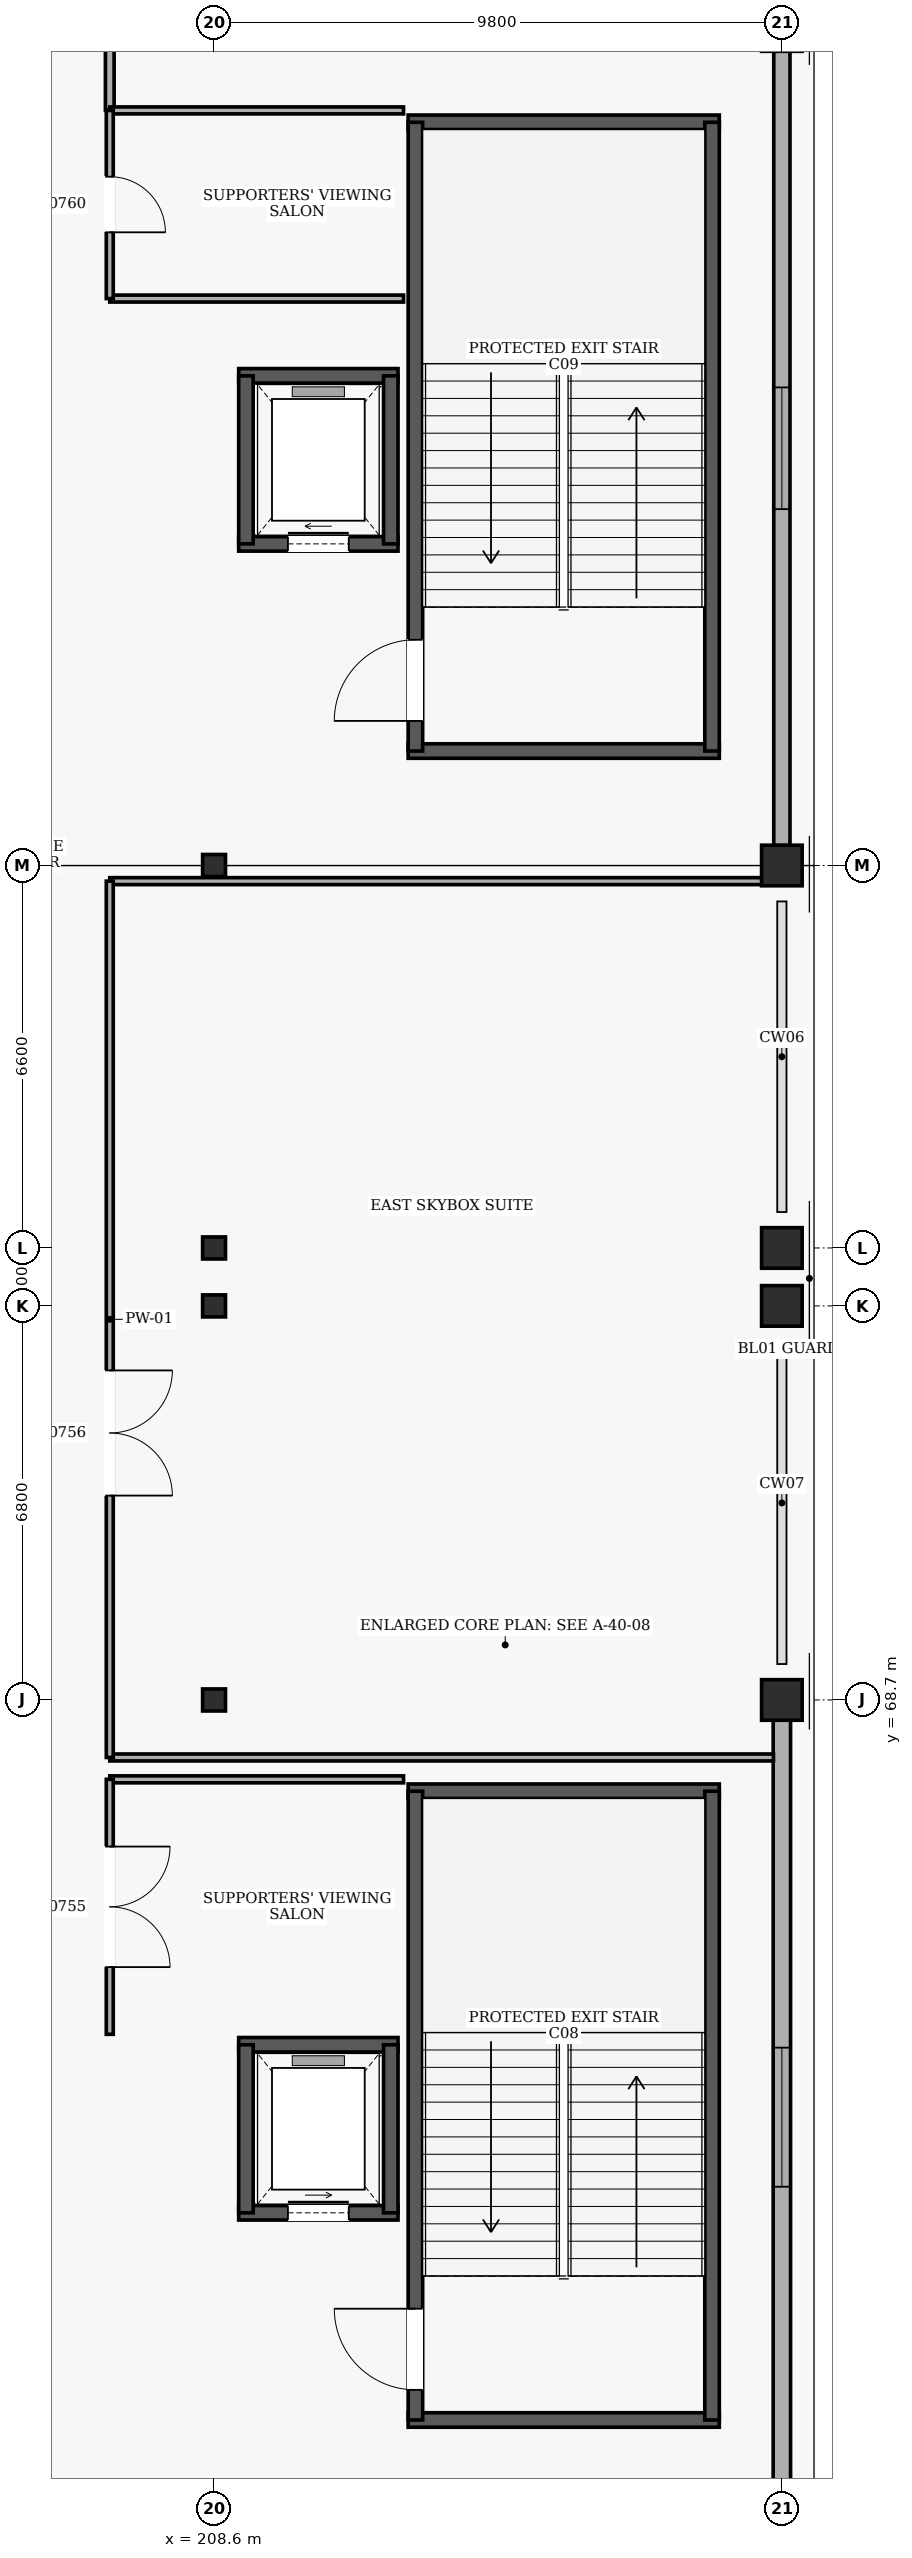
"""IFC4 building model, lengths in metres.
Left out: names, types, materials, properties, quantities, classifications, styles, units other than length and angle.
Written with IfcOpenShell. Run it as: python <this file> out.ifc"""

import sys

from ifc_helpers import new_model, si_unit, direction, frame, frame_2d, origin, origin_2d, place, context, subcontext, project, spatial, rectangle, i_section, extrude, element, fill, save


model = new_model("IFC4")
c1 = context("Model", 3, precision=1e-05, world=origin(), true_north=direction((0.0, 1.0)))
c2 = subcontext(c1, "Body", "Model", "MODEL_VIEW")
j1 = project(units=[si_unit("LENGTHUNIT", "METRE"), si_unit("PLANEANGLEUNIT", "RADIAN")], contexts=[c1])
p1 = place(None, origin())
s1 = spatial("IfcSite", under=j1, at=p1, CompositionType="ELEMENT")
p2 = place(p1, origin())
s2 = spatial("IfcBuilding", under=s1, at=p2, CompositionType="ELEMENT")
p3 = place(p2, frame((0.0, 0.0, 19.8)))
s3 = spatial("IfcBuildingStorey", under=s2, at=p3, CompositionType="ELEMENT", Elevation=19.8)
for number, where, z_axis, x_axis in (
    (1, (208.6, 68.7, 0.0), (0.0, 0.0, 1.0), (1.0, 0.0, 0.0)),
    (2, (208.6, 75.5, 0.0), (0.0, 0.0, 1.0), (1.0, 0.0, 0.0)),
    (3, (208.6, 76.5, 0.0), (0.0, 0.0, 1.0), (1.0, 0.0, 0.0)),
    (4, (208.6, 83.1, 0.0), (0.0, 0.0, 1.0), (1.0, 0.0, 0.0)),
):
    element("IfcColumn", number, at=place(p3, frame(where, z_axis=z_axis, x_axis=x_axis)), inside=s3, PredefinedType="COLUMN", context=c2, shape_type="SweptSolid", body=[
        extrude(i_section(OverallWidth=0.395, OverallDepth=0.38, WebThickness=0.019, FlangeThickness=0.03, at=origin_2d()), origin(), (0.0, 0.0, 1.0), 4.8),
    ])
for number, where, z_axis, x_axis in (
    (5, (218.4, 68.7, 0.0), (0.0, 0.0, 1.0), (1.0, 0.0, 0.0)),
    (6, (218.4, 75.5, 0.0), (0.0, 0.0, 1.0), (1.0, 0.0, 0.0)),
    (7, (218.4, 76.5, 0.0), (0.0, 0.0, 1.0), (1.0, 0.0, 0.0)),
    (8, (218.4, 83.1, 0.0), (0.0, 0.0, 1.0), (1.0, 0.0, 0.0)),
):
    element("IfcColumn", number, at=place(p3, frame(where, z_axis=z_axis, x_axis=x_axis)), inside=s3, PredefinedType="COLUMN", context=c2, shape_type="SweptSolid", body=[
        extrude(rectangle(XDim=0.7, YDim=0.7, at=origin_2d()), origin(), (0.0, 0.0, 1.0), 4.8),
    ])
p4 = place(p3, frame((218.4, 97.155, 0.0), z_axis=(0.0, 0.0, 1.0), x_axis=(0.0, -1.0, 0.0)))
e9 = element("IfcWall", 9, at=p4, inside=s3, PredefinedType="SOLIDWALL", context=c2, shape_type="SweptSolid", body=[
    extrude(rectangle(XDim=13.71, YDim=0.28, at=frame_2d((6.855, 0.0))), origin(), (0.0, 0.0, 1.0), 3.58),
])
p5 = place(p4, frame((5.805, 0.0, 0.9)))
e10 = element("IfcOpeningElement", 10, at=p5, cuts=e9, PredefinedType="OPENING", context=c2, shape_type="SweptSolid", body=[
    extrude(rectangle(XDim=2.1, YDim=1.8, at=frame_2d((1.05, 0.9))), frame((0.0, 0.15, 0.0), z_axis=(0.0, -1.0, 0.0), x_axis=(1.0, 0.0, 0.0)), (0.0, 0.0, 1.0), 0.3),
])
p6 = place(p3, frame((218.4, 68.355, 0.0), z_axis=(0.0, 0.0, 1.0), x_axis=(0.0, -1.0, 0.0)))
e11 = element("IfcWall", 11, at=p6, inside=s3, PredefinedType="SOLIDWALL", context=c2, shape_type="SweptSolid", body=[
    extrude(rectangle(XDim=13.71, YDim=0.3, at=frame_2d((6.855, 0.0))), origin(), (0.0, 0.0, 1.0), 3.58),
])
p7 = place(p6, frame((5.655, 0.0, 0.9)))
e12 = element("IfcOpeningElement", 12, at=p7, cuts=e11, PredefinedType="OPENING", context=c2, shape_type="SweptSolid", body=[
    extrude(rectangle(XDim=2.4, YDim=1.8, at=frame_2d((1.2, 0.9))), frame((0.0, 0.16, 0.0), z_axis=(0.0, -1.0, 0.0), x_axis=(1.0, 0.0, 0.0)), (0.0, 0.0, 1.0), 0.32),
])
for number, where, z_axis, x_axis in (
    (13, (211.95, 56.275, 0.0), (0.0, 0.0, 1.0), (1.0, 0.0, 0.0)),
    (14, (217.32, 67.125, 0.0), (0.0, 0.0, 1.0), (-1.0, 0.0, 0.0)),
):
    element("IfcWall", number, at=place(p3, frame(where, z_axis=z_axis, x_axis=x_axis)), inside=s3, PredefinedType="SHEAR", context=c2, shape_type="SweptSolid", body=[
        extrude(rectangle(XDim=5.37, YDim=0.25, at=frame_2d((2.685, 0.0))), origin(), (0.0, 0.0, 1.0), 4.5),
    ])
p8 = place(p3, frame((212.075, 56.275, 0.0), z_axis=(0.0, 0.0, 1.0), x_axis=(0.0, 1.0, 0.0)))
e15 = element("IfcWall", 15, at=p8, inside=s3, PredefinedType="SHEAR", context=c2, shape_type="SweptSolid", body=[
    extrude(rectangle(XDim=10.85, YDim=0.25, at=frame_2d((5.425, 0.0))), origin(), (0.0, 0.0, 1.0), 4.5),
])
p9 = place(p8, frame((0.52, 0.0, 0.0)))
e16 = element("IfcOpeningElement", 16, at=p9, cuts=e15, PredefinedType="OPENING", context=c2, shape_type="SweptSolid", body=[
    extrude(rectangle(XDim=1.4, YDim=2.15, at=frame_2d((0.7, 1.075))), frame((0.0, 0.135, 0.0), z_axis=(0.0, -1.0, 0.0), x_axis=(1.0, 0.0, 0.0)), (0.0, 0.0, 1.0), 0.27),
])
p10 = place(p3, frame((217.195, 56.275, 0.0), z_axis=(0.0, 0.0, 1.0), x_axis=(0.0, 1.0, 0.0)))
e17 = element("IfcWall", 17, at=p10, inside=s3, PredefinedType="SHEAR", context=c2, shape_type="SweptSolid", body=[
    extrude(rectangle(XDim=10.85, YDim=0.25, at=frame_2d((5.425, 0.0))), origin(), (0.0, 0.0, 1.0), 4.5),
])
for number, where, z_axis, x_axis in (
    (18, (211.95, 85.075, 0.0), (0.0, 0.0, 1.0), (1.0, 0.0, 0.0)),
    (19, (217.32, 95.925, 0.0), (0.0, 0.0, 1.0), (-1.0, 0.0, 0.0)),
):
    element("IfcWall", number, at=place(p3, frame(where, z_axis=z_axis, x_axis=x_axis)), inside=s3, PredefinedType="SHEAR", context=c2, shape_type="SweptSolid", body=[
        extrude(rectangle(XDim=5.37, YDim=0.25, at=frame_2d((2.685, 0.0))), origin(), (0.0, 0.0, 1.0), 4.5),
    ])
p11 = place(p3, frame((212.075, 85.075, 0.0), z_axis=(0.0, 0.0, 1.0), x_axis=(0.0, 1.0, 0.0)))
e20 = element("IfcWall", 20, at=p11, inside=s3, PredefinedType="SHEAR", context=c2, shape_type="SweptSolid", body=[
    extrude(rectangle(XDim=10.85, YDim=0.25, at=frame_2d((5.425, 0.0))), origin(), (0.0, 0.0, 1.0), 4.5),
])
p12 = place(p11, frame((0.52, 0.0, 0.0)))
e21 = element("IfcOpeningElement", 21, at=p12, cuts=e20, PredefinedType="OPENING", context=c2, shape_type="SweptSolid", body=[
    extrude(rectangle(XDim=1.4, YDim=2.15, at=frame_2d((0.7, 1.075))), frame((0.0, 0.135, 0.0), z_axis=(0.0, -1.0, 0.0), x_axis=(1.0, 0.0, 0.0)), (0.0, 0.0, 1.0), 0.27),
])
p13 = place(p3, frame((217.195, 85.075, 0.0), z_axis=(0.0, 0.0, 1.0), x_axis=(0.0, 1.0, 0.0)))
e22 = element("IfcWall", 22, at=p13, inside=s3, PredefinedType="SHEAR", context=c2, shape_type="SweptSolid", body=[
    extrude(rectangle(XDim=10.85, YDim=0.25, at=frame_2d((5.425, 0.0))), origin(), (0.0, 0.0, 1.0), 4.5),
])
p14 = place(p3, frame((209.025, 59.85, 0.0), z_axis=(0.0, 0.0, 1.0), x_axis=(1.0, 0.0, 0.0)))
e23 = element("IfcWall", 23, at=p14, inside=s3, PredefinedType="SHEAR", context=c2, shape_type="SweptSolid", body=[
    extrude(rectangle(XDim=2.75, YDim=0.25, at=frame_2d((1.375, 0.0))), origin(), (0.0, 0.0, 1.0), 4.5),
])
p15 = place(p14, frame((0.85, 0.0, 0.0)))
e24 = element("IfcOpeningElement", 24, at=p15, cuts=e23, PredefinedType="OPENING", context=c2, shape_type="SweptSolid", body=[
    extrude(rectangle(XDim=1.05, YDim=2.15, at=frame_2d((0.525, 1.075))), frame((0.0, 0.135, 0.0), z_axis=(0.0, -1.0, 0.0), x_axis=(1.0, 0.0, 0.0)), (0.0, 0.0, 1.0), 0.27),
])
p16 = place(p3, frame((211.775, 62.75, 0.0), z_axis=(0.0, 0.0, 1.0), x_axis=(-1.0, 0.0, 0.0)))
e25 = element("IfcWall", 25, at=p16, inside=s3, PredefinedType="SHEAR", context=c2, shape_type="SweptSolid", body=[
    extrude(rectangle(XDim=2.75, YDim=0.25, at=frame_2d((1.375, 0.0))), origin(), (0.0, 0.0, 1.0), 4.5),
])
for number, where, z_axis, x_axis in (
    (26, (209.15, 62.75, 0.0), (0.0, 0.0, 1.0), (0.0, -1.0, 0.0)),
    (27, (211.65, 59.85, 0.0), (0.0, 0.0, 1.0), (0.0, 1.0, 0.0)),
):
    element("IfcWall", number, at=place(p3, frame(where, z_axis=z_axis, x_axis=x_axis)), inside=s3, PredefinedType="SHEAR", context=c2, shape_type="SweptSolid", body=[
        extrude(rectangle(XDim=2.9, YDim=0.25, at=frame_2d((1.45, 0.0))), origin(), (0.0, 0.0, 1.0), 4.5),
    ])
p17 = place(p3, frame((209.025, 88.65, 0.0), z_axis=(0.0, 0.0, 1.0), x_axis=(1.0, 0.0, 0.0)))
e28 = element("IfcWall", 28, at=p17, inside=s3, PredefinedType="SHEAR", context=c2, shape_type="SweptSolid", body=[
    extrude(rectangle(XDim=2.75, YDim=0.25, at=frame_2d((1.375, 0.0))), origin(), (0.0, 0.0, 1.0), 4.5),
])
p18 = place(p17, frame((0.85, 0.0, 0.0)))
e29 = element("IfcOpeningElement", 29, at=p18, cuts=e28, PredefinedType="OPENING", context=c2, shape_type="SweptSolid", body=[
    extrude(rectangle(XDim=1.05, YDim=2.15, at=frame_2d((0.525, 1.075))), frame((0.0, 0.135, 0.0), z_axis=(0.0, -1.0, 0.0), x_axis=(1.0, 0.0, 0.0)), (0.0, 0.0, 1.0), 0.27),
])
p19 = place(p3, frame((211.775, 91.55, 0.0), z_axis=(0.0, 0.0, 1.0), x_axis=(-1.0, 0.0, 0.0)))
e30 = element("IfcWall", 30, at=p19, inside=s3, PredefinedType="SHEAR", context=c2, shape_type="SweptSolid", body=[
    extrude(rectangle(XDim=2.75, YDim=0.25, at=frame_2d((1.375, 0.0))), origin(), (0.0, 0.0, 1.0), 4.5),
])
for number, where, z_axis, x_axis in (
    (31, (209.15, 91.55, 0.0), (0.0, 0.0, 1.0), (0.0, -1.0, 0.0)),
    (32, (211.65, 88.65, 0.0), (0.0, 0.0, 1.0), (0.0, 1.0, 0.0)),
):
    element("IfcWall", number, at=place(p3, frame(where, z_axis=z_axis, x_axis=x_axis)), inside=s3, PredefinedType="SHEAR", context=c2, shape_type="SweptSolid", body=[
        extrude(rectangle(XDim=2.9, YDim=0.25, at=frame_2d((1.45, 0.0))), origin(), (0.0, 0.0, 1.0), 4.5),
    ])
p20 = place(p3, frame((211.87, 67.33, 0.0), z_axis=(0.0, 0.0, 1.0), x_axis=(-1.0, 0.0, 0.0)))
e33 = element("IfcWall", 33, at=p20, inside=s3, PredefinedType="PARTITIONING", context=c2, shape_type="SweptSolid", body=[
    extrude(rectangle(XDim=5.07, YDim=0.12, at=frame_2d((2.535, 0.0))), origin(), (0.0, 0.0, 1.0), 4.5),
])
p21 = place(p3, frame((206.8, 67.33, 0.0), z_axis=(0.0, 0.0, 1.0), x_axis=(0.0, -1.0, 0.0)))
e34 = element("IfcWall", 34, at=p21, inside=s3, PredefinedType="PARTITIONING", context=c2, shape_type="SweptSolid", body=[
    extrude(rectangle(XDim=4.4, YDim=0.12, at=frame_2d((2.2, 0.0))), origin(), (0.0, 0.0, 1.0), 4.5),
])
p22 = place(p21, frame((1.16, 0.0, 0.0)))
e35 = element("IfcOpeningElement", 35, at=p22, cuts=e34, PredefinedType="OPENING", context=c2, shape_type="SweptSolid", body=[
    extrude(rectangle(XDim=2.08, YDim=2.35, at=frame_2d((1.04, 1.175))), frame((0.0, 0.07, 0.0), z_axis=(0.0, -1.0, 0.0), x_axis=(1.0, 0.0, 0.0)), (0.0, 0.0, 1.0), 0.14),
])
p23 = place(p3, frame((206.8, 67.708, 0.0), z_axis=(0.0, 0.0, 1.0), x_axis=(1.0, 0.0, 0.0)))
e36 = element("IfcWall", 36, at=p23, inside=s3, PredefinedType="PARTITIONING", context=c2, shape_type="SweptSolid", body=[
    extrude(rectangle(XDim=11.455, YDim=0.12, at=frame_2d((5.728, 0.0))), origin(), (0.0, 0.0, 1.0), 4.5),
])
p24 = place(p3, frame((218.255, 82.83, 0.0), z_axis=(0.0, 0.0, 1.0), x_axis=(-1.0, 0.0, 0.0)))
e37 = element("IfcWall", 37, at=p24, inside=s3, PredefinedType="PARTITIONING", context=c2, shape_type="SweptSolid", body=[
    extrude(rectangle(XDim=11.455, YDim=0.12, at=frame_2d((5.728, 0.0))), origin(), (0.0, 0.0, 1.0), 3.58),
])
p25 = place(p3, frame((206.8, 82.83, 0.0), z_axis=(0.0, 0.0, 1.0), x_axis=(0.0, -1.0, 0.0)))
e38 = element("IfcWall", 38, at=p25, inside=s3, PredefinedType="PARTITIONING", context=c2, shape_type="SweptSolid", body=[
    extrude(rectangle(XDim=15.123, YDim=0.12, at=frame_2d((7.561, 0.0))), origin(), (0.0, 0.0, 1.0), 4.5),
])
p26 = place(p25, frame((8.443, 0.0, 0.0)))
e39 = element("IfcOpeningElement", 39, at=p26, cuts=e38, PredefinedType="OPENING", context=c2, shape_type="SweptSolid", body=[
    extrude(rectangle(XDim=2.16, YDim=2.35, at=frame_2d((1.08, 1.175))), frame((0.0, 0.07, 0.0), z_axis=(0.0, -1.0, 0.0), x_axis=(1.0, 0.0, 0.0)), (0.0, 0.0, 1.0), 0.14),
])
p27 = place(p3, frame((206.8, 101.817, 0.0), z_axis=(0.0, 0.0, 1.0), x_axis=(0.0, -1.0, 0.0)))
e40 = element("IfcWall", 40, at=p27, inside=s3, PredefinedType="PARTITIONING", context=c2, shape_type="SweptSolid", body=[
    extrude(rectangle(XDim=5.687, YDim=0.15, at=frame_2d((2.843, 0.0))), origin(), (0.0, 0.0, 1.0), 4.5),
])
p28 = place(p27, frame((2.383, 0.0, 0.0)))
e41 = element("IfcOpeningElement", 41, at=p28, cuts=e40, PredefinedType="OPENING", context=c2, shape_type="SweptSolid", body=[
    extrude(rectangle(XDim=0.92, YDim=2.1, at=frame_2d((0.46, 1.05))), frame((0.0, 0.085, 0.0), z_axis=(0.0, -1.0, 0.0), x_axis=(1.0, 0.0, 0.0)), (0.0, 0.0, 1.0), 0.17),
])
for number, where, z_axis, x_axis in (
    (42, (206.8, 92.883, 0.0), (0.0, 0.0, 1.0), (1.0, 0.0, 0.0)),
    (43, (211.87, 96.13, 0.0), (0.0, 0.0, 1.0), (-1.0, 0.0, 0.0)),
):
    element("IfcWall", number, at=place(p3, frame(where, z_axis=z_axis, x_axis=x_axis)), inside=s3, PredefinedType="PARTITIONING", context=c2, shape_type="SweptSolid", body=[
        extrude(rectangle(XDim=5.07, YDim=0.12, at=frame_2d((2.535, 0.0))), origin(), (0.0, 0.0, 1.0), 4.5),
    ])
p29 = place(p3, frame((206.8, 96.13, 0.0), z_axis=(0.0, 0.0, 1.0), x_axis=(0.0, -1.0, 0.0)))
e44 = element("IfcWall", 44, at=p29, inside=s3, PredefinedType="PARTITIONING", context=c2, shape_type="SweptSolid", body=[
    extrude(rectangle(XDim=3.247, YDim=0.12, at=frame_2d((1.623, 0.0))), origin(), (0.0, 0.0, 1.0), 4.5),
])
p30 = place(p29, frame((1.143, 0.0, 0.0)))
e45 = element("IfcOpeningElement", 45, at=p30, cuts=e44, PredefinedType="OPENING", context=c2, shape_type="SweptSolid", body=[
    extrude(rectangle(XDim=0.96, YDim=2.1, at=frame_2d((0.48, 1.05))), frame((0.0, 0.07, 0.0), z_axis=(0.0, -1.0, 0.0), x_axis=(1.0, 0.0, 0.0)), (0.0, 0.0, 1.0), 0.14),
])
p31 = place(p5, origin())
e46 = element("IfcWindow", 46, at=p31, inside=s3, PartitioningType="SINGLE_PANEL", PredefinedType="WINDOW", context=c2, shape_type="SweptSolid", body=[
    extrude(rectangle(XDim=2.1, YDim=1.8, at=frame_2d((1.05, 0.9))), frame((0.0, 0.03, 0.0), z_axis=(0.0, -1.0, 0.0), x_axis=(1.0, 0.0, 0.0)), (0.0, 0.0, 1.0), 0.06),
])
fill(e10, e46)
p32 = place(p7, origin())
e47 = element("IfcWindow", 47, at=p32, inside=s3, PartitioningType="SINGLE_PANEL", PredefinedType="WINDOW", context=c2, shape_type="SweptSolid", body=[
    extrude(rectangle(XDim=2.4, YDim=1.8, at=frame_2d((1.2, 0.9))), frame((0.0, 0.03, 0.0), z_axis=(0.0, -1.0, 0.0), x_axis=(1.0, 0.0, 0.0)), (0.0, 0.0, 1.0), 0.06),
])
fill(e12, e47)
p33 = place(p9, frame((1.4, 0.0, 0.0), z_axis=(0.0, 0.0, 1.0), x_axis=(-1.0, 0.0, 0.0)))
e48 = element("IfcDoor", 48, at=p33, inside=s3, OperationType="SINGLE_SWING_LEFT", PredefinedType="DOOR", context=c2, shape_type="SweptSolid", body=[
    extrude(rectangle(XDim=1.4, YDim=2.15, at=frame_2d((0.7, 1.075))), frame((0.0, 0.025, 0.0), z_axis=(0.0, -1.0, 0.0), x_axis=(1.0, 0.0, 0.0)), (0.0, 0.0, 1.0), 0.05),
])
fill(e16, e48)
p34 = place(p12, frame((1.4, 0.0, 0.0), z_axis=(0.0, 0.0, 1.0), x_axis=(-1.0, 0.0, 0.0)))
e49 = element("IfcDoor", 49, at=p34, inside=s3, OperationType="SINGLE_SWING_RIGHT", PredefinedType="DOOR", context=c2, shape_type="SweptSolid", body=[
    extrude(rectangle(XDim=1.4, YDim=2.15, at=frame_2d((0.7, 1.075))), frame((0.0, 0.025, 0.0), z_axis=(0.0, -1.0, 0.0), x_axis=(1.0, 0.0, 0.0)), (0.0, 0.0, 1.0), 0.05),
])
fill(e21, e49)
p35 = place(p15, origin())
e50 = element("IfcDoor", 50, at=p35, inside=s3, OperationType="SLIDING_TO_LEFT", PredefinedType="DOOR", context=c2, shape_type="SweptSolid", body=[
    extrude(rectangle(XDim=1.05, YDim=2.15, at=frame_2d((0.525, 1.075))), frame((0.0, 0.025, 0.0), z_axis=(0.0, -1.0, 0.0), x_axis=(1.0, 0.0, 0.0)), (0.0, 0.0, 1.0), 0.05),
])
fill(e24, e50)
p36 = place(p18, origin())
e51 = element("IfcDoor", 51, at=p36, inside=s3, OperationType="SLIDING_TO_RIGHT", PredefinedType="DOOR", context=c2, shape_type="SweptSolid", body=[
    extrude(rectangle(XDim=1.05, YDim=2.15, at=frame_2d((0.525, 1.075))), frame((0.0, 0.025, 0.0), z_axis=(0.0, -1.0, 0.0), x_axis=(1.0, 0.0, 0.0)), (0.0, 0.0, 1.0), 0.05),
])
fill(e29, e51)
p37 = place(p22, origin())
e52 = element("IfcDoor", 52, at=p37, inside=s3, OperationType="DOUBLE_DOOR_SINGLE_SWING", PredefinedType="DOOR", context=c2, shape_type="SweptSolid", body=[
    extrude(rectangle(XDim=2.08, YDim=2.35, at=frame_2d((1.04, 1.175))), frame((0.0, 0.025, 0.0), z_axis=(0.0, -1.0, 0.0), x_axis=(1.0, 0.0, 0.0)), (0.0, 0.0, 1.0), 0.05),
])
fill(e35, e52)
p38 = place(p26, origin())
e53 = element("IfcDoor", 53, at=p38, inside=s3, OperationType="DOUBLE_DOOR_SINGLE_SWING", PredefinedType="DOOR", context=c2, shape_type="SweptSolid", body=[
    extrude(rectangle(XDim=2.16, YDim=2.35, at=frame_2d((1.08, 1.175))), frame((0.0, 0.025, 0.0), z_axis=(0.0, -1.0, 0.0), x_axis=(1.0, 0.0, 0.0)), (0.0, 0.0, 1.0), 0.05),
])
fill(e39, e53)
p39 = place(p30, origin())
e54 = element("IfcDoor", 54, at=p39, inside=s3, OperationType="SINGLE_SWING_RIGHT", PredefinedType="DOOR", context=c2, shape_type="SweptSolid", body=[
    extrude(rectangle(XDim=0.96, YDim=2.1, at=frame_2d((0.48, 1.05))), frame((0.0, 0.025, 0.0), z_axis=(0.0, -1.0, 0.0), x_axis=(1.0, 0.0, 0.0)), (0.0, 0.0, 1.0), 0.05),
])
fill(e45, e54)
save(model, sys.argv[1])
